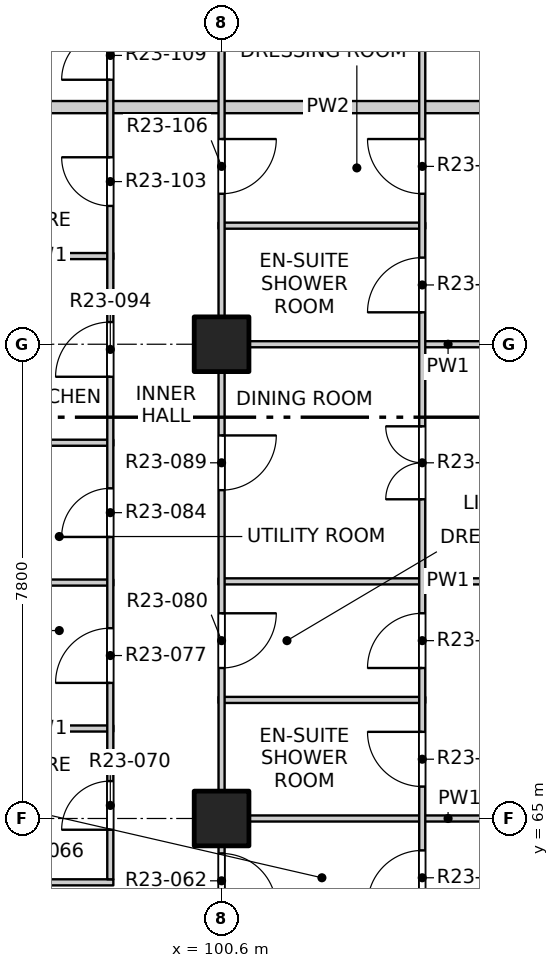
"""IFC4 building model, lengths in metres.
Left out: names, types, materials, properties, quantities, classifications, styles, units other than length and angle.
Written with IfcOpenShell. Run it as: python <this file> out.ifc"""

import sys

from ifc_helpers import new_model, si_unit, direction, frame, frame_2d, origin, origin_2d, place, context, subcontext, project, spatial, rectangle, extrude, element, fill, save


model = new_model("IFC4")
c1 = context("Model", 3, precision=1e-05, world=origin(), true_north=direction((0.0, 1.0)))
c2 = subcontext(c1, "Body", "Model", "MODEL_VIEW")
j1 = project(units=[si_unit("LENGTHUNIT", "METRE"), si_unit("PLANEANGLEUNIT", "RADIAN")], contexts=[c1])
p1 = place(None, origin())
s1 = spatial("IfcSite", under=j1, at=p1, CompositionType="ELEMENT")
p2 = place(p1, origin())
s2 = spatial("IfcBuilding", under=s1, at=p2, CompositionType="ELEMENT")
p3 = place(p2, frame((0.0, 0.0, 238.1)))
s3 = spatial("IfcBuildingStorey", under=s2, at=p3, CompositionType="ELEMENT", Elevation=238.1)
for number, where, z_axis, x_axis in (
    (1, (100.6, 65.0, -0.25), (0.0, 0.0, 1.0), (1.0, 0.0, 0.0)),
    (2, (100.6, 72.8, -0.25), (0.0, 0.0, 1.0), (1.0, 0.0, 0.0)),
):
    element("IfcColumn", number, at=place(p3, frame(where, z_axis=z_axis, x_axis=x_axis)), inside=s3, PredefinedType="COLUMN", context=c2, shape_type="SweptSolid", body=[
        extrude(rectangle(XDim=0.9, YDim=0.9, at=origin_2d()), origin(), (0.0, 0.0, 1.0), 3.35),
    ])
p4 = place(p3, frame((96.6, 63.95, 0.0), z_axis=(0.0, 0.0, 1.0), x_axis=(1.0, 0.0, 0.0)))
e3 = element("IfcWall", 3, at=p4, inside=s3, PredefinedType="PARTITIONING", context=c2, shape_type="SweptSolid", body=[
    extrude(rectangle(XDim=2.22, YDim=0.1, at=frame_2d((1.11, 0.0))), origin(), (0.0, 0.0, 1.0), 3.1),
])
p5 = place(p3, frame((100.55, 65.0, 0.0), z_axis=(0.0, 0.0, 1.0), x_axis=(1.0, 0.0, 0.0)))
e4 = element("IfcWall", 4, at=p5, inside=s3, PredefinedType="PARTITIONING", context=c2, shape_type="SweptSolid", body=[
    extrude(rectangle(XDim=7.55, YDim=0.1, at=frame_2d((3.775, 0.0))), origin(), (0.0, 0.0, 1.0), 3.1),
])
p6 = place(p3, frame((96.6, 66.48, 0.0), z_axis=(0.0, 0.0, 1.0), x_axis=(1.0, 0.0, 0.0)))
e5 = element("IfcWall", 5, at=p6, inside=s3, PredefinedType="PARTITIONING", context=c2, shape_type="SweptSolid", body=[
    extrude(rectangle(XDim=2.22, YDim=0.1, at=frame_2d((1.11, 0.0))), origin(), (0.0, 0.0, 1.0), 3.1),
])
p7 = place(p3, frame((100.55, 66.95, 0.0), z_axis=(0.0, 0.0, 1.0), x_axis=(1.0, 0.0, 0.0)))
e6 = element("IfcWall", 6, at=p7, inside=s3, PredefinedType="PARTITIONING", context=c2, shape_type="SweptSolid", body=[
    extrude(rectangle(XDim=3.4, YDim=0.1, at=frame_2d((1.7, 0.0))), origin(), (0.0, 0.0, 1.0), 3.1),
])
p8 = place(p3, frame((96.6, 68.88, 0.0), z_axis=(0.0, 0.0, 1.0), x_axis=(1.0, 0.0, 0.0)))
e7 = element("IfcWall", 7, at=p8, inside=s3, PredefinedType="PARTITIONING", context=c2, shape_type="SweptSolid", body=[
    extrude(rectangle(XDim=2.22, YDim=0.1, at=frame_2d((1.11, 0.0))), origin(), (0.0, 0.0, 1.0), 3.1),
])
p9 = place(p3, frame((100.55, 68.9, 0.0), z_axis=(0.0, 0.0, 1.0), x_axis=(1.0, 0.0, 0.0)))
e8 = element("IfcWall", 8, at=p9, inside=s3, PredefinedType="PARTITIONING", context=c2, shape_type="SweptSolid", body=[
    extrude(rectangle(XDim=7.55, YDim=0.1, at=frame_2d((3.775, 0.0))), origin(), (0.0, 0.0, 1.0), 3.1),
])
p10 = place(p3, frame((96.6, 71.18, 0.0), z_axis=(0.0, 0.0, 1.0), x_axis=(1.0, 0.0, 0.0)))
e9 = element("IfcWall", 9, at=p10, inside=s3, PredefinedType="PARTITIONING", context=c2, shape_type="SweptSolid", body=[
    extrude(rectangle(XDim=2.22, YDim=0.1, at=frame_2d((1.11, 0.0))), origin(), (0.0, 0.0, 1.0), 3.1),
])
p11 = place(p3, frame((100.55, 72.8, 0.0), z_axis=(0.0, 0.0, 1.0), x_axis=(1.0, 0.0, 0.0)))
e10 = element("IfcWall", 10, at=p11, inside=s3, PredefinedType="PARTITIONING", context=c2, shape_type="SweptSolid", body=[
    extrude(rectangle(XDim=7.55, YDim=0.1, at=frame_2d((3.775, 0.0))), origin(), (0.0, 0.0, 1.0), 3.1),
])
p12 = place(p3, frame((96.6, 74.25, 0.0), z_axis=(0.0, 0.0, 1.0), x_axis=(1.0, 0.0, 0.0)))
e11 = element("IfcWall", 11, at=p12, inside=s3, PredefinedType="PARTITIONING", context=c2, shape_type="SweptSolid", body=[
    extrude(rectangle(XDim=2.22, YDim=0.1, at=frame_2d((1.11, 0.0))), origin(), (0.0, 0.0, 1.0), 3.1),
])
p13 = place(p3, frame((100.55, 74.75, 0.0), z_axis=(0.0, 0.0, 1.0), x_axis=(1.0, 0.0, 0.0)))
e12 = element("IfcWall", 12, at=p13, inside=s3, PredefinedType="PARTITIONING", context=c2, shape_type="SweptSolid", body=[
    extrude(rectangle(XDim=3.4, YDim=0.1, at=frame_2d((1.7, 0.0))), origin(), (0.0, 0.0, 1.0), 3.1),
])
p14 = place(p3, frame((96.6, 76.7, 0.0), z_axis=(0.0, 0.0, 1.0), x_axis=(1.0, 0.0, 0.0)))
e13 = element("IfcWall", 13, at=p14, inside=s3, PredefinedType="PARTITIONING", context=c2, shape_type="SweptSolid", body=[
    extrude(rectangle(XDim=11.5, YDim=0.2, at=frame_2d((5.75, 0.0))), origin(), (0.0, 0.0, 1.0), 3.1),
])
p15 = place(p3, frame((98.77, 64.0, 0.0), z_axis=(0.0, 0.0, 1.0), x_axis=(0.0, 1.0, 0.0)))
e14 = element("IfcWall", 14, at=p15, inside=s3, PredefinedType="PARTITIONING", context=c2, shape_type="SweptSolid", body=[
    extrude(rectangle(XDim=14.35, YDim=0.1, at=frame_2d((7.175, 0.0))), origin(), (0.0, 0.0, 1.0), 3.1),
])
p16 = place(p15, frame((0.815, 0.0, 0.0)))
e15 = element("IfcOpeningElement", 15, at=p16, cuts=e14, PredefinedType="OPENING", context=c2, shape_type="SweptSolid", body=[
    extrude(rectangle(XDim=0.8, YDim=2.1, at=frame_2d((0.4, 1.05))), frame((0.0, 0.06, 0.0), z_axis=(0.0, -1.0, 0.0), x_axis=(1.0, 0.0, 0.0)), (0.0, 0.0, 1.0), 0.12),
])
p17 = place(p15, frame((3.23, 0.0, 0.0)))
e16 = element("IfcOpeningElement", 16, at=p17, cuts=e14, PredefinedType="OPENING", context=c2, shape_type="SweptSolid", body=[
    extrude(rectangle(XDim=0.9, YDim=2.1, at=frame_2d((0.45, 1.05))), frame((0.0, 0.06, 0.0), z_axis=(0.0, -1.0, 0.0), x_axis=(1.0, 0.0, 0.0)), (0.0, 0.0, 1.0), 0.12),
])
p18 = place(p15, frame((5.63, 0.0, 0.0)))
e17 = element("IfcOpeningElement", 17, at=p18, cuts=e14, PredefinedType="OPENING", context=c2, shape_type="SweptSolid", body=[
    extrude(rectangle(XDim=0.8, YDim=2.1, at=frame_2d((0.4, 1.05))), frame((0.0, 0.06, 0.0), z_axis=(0.0, -1.0, 0.0), x_axis=(1.0, 0.0, 0.0)), (0.0, 0.0, 1.0), 0.12),
])
p19 = place(p15, frame((8.265, 0.0, 0.0)))
e18 = element("IfcOpeningElement", 18, at=p19, cuts=e14, PredefinedType="OPENING", context=c2, shape_type="SweptSolid", body=[
    extrude(rectangle(XDim=0.9, YDim=2.1, at=frame_2d((0.45, 1.05))), frame((0.0, 0.06, 0.0), z_axis=(0.0, -1.0, 0.0), x_axis=(1.0, 0.0, 0.0)), (0.0, 0.0, 1.0), 0.12),
])
p20 = place(p15, frame((11.075, 0.0, 0.0)))
e19 = element("IfcOpeningElement", 19, at=p20, cuts=e14, PredefinedType="OPENING", context=c2, shape_type="SweptSolid", body=[
    extrude(rectangle(XDim=0.8, YDim=2.1, at=frame_2d((0.4, 1.05))), frame((0.0, 0.06, 0.0), z_axis=(0.0, -1.0, 0.0), x_axis=(1.0, 0.0, 0.0)), (0.0, 0.0, 1.0), 0.12),
])
p21 = place(p15, frame((13.15, 0.0, 0.0)))
e20 = element("IfcOpeningElement", 20, at=p21, cuts=e14, PredefinedType="OPENING", context=c2, shape_type="SweptSolid", body=[
    extrude(rectangle(XDim=0.8, YDim=2.1, at=frame_2d((0.4, 1.05))), frame((0.0, 0.06, 0.0), z_axis=(0.0, -1.0, 0.0), x_axis=(1.0, 0.0, 0.0)), (0.0, 0.0, 1.0), 0.12),
])
p22 = place(p3, frame((100.6, 41.9, 0.0), z_axis=(0.0, 0.0, 1.0), x_axis=(0.0, 1.0, 0.0)))
e21 = element("IfcWall", 21, at=p22, inside=s3, PredefinedType="PARTITIONING", context=c2, shape_type="SweptSolid", body=[
    extrude(rectangle(XDim=46.2, YDim=0.1, at=frame_2d((23.1, 0.0))), origin(), (0.0, 0.0, 1.0), 3.1),
])
p23 = place(p22, frame((1.2, 0.0, 0.0)))
e22 = element("IfcOpeningElement", 22, at=p23, cuts=e21, PredefinedType="OPENING", context=c2, shape_type="SweptSolid", body=[
    extrude(rectangle(XDim=0.9, YDim=2.1, at=frame_2d((0.45, 1.05))), frame((0.0, 0.06, 0.0), z_axis=(0.0, -1.0, 0.0), x_axis=(1.0, 0.0, 0.0)), (0.0, 0.0, 1.0), 0.12),
])
p24 = place(p22, frame((6.025, 0.0, 0.0)))
e23 = element("IfcOpeningElement", 23, at=p24, cuts=e21, PredefinedType="OPENING", context=c2, shape_type="SweptSolid", body=[
    extrude(rectangle(XDim=0.9, YDim=2.1, at=frame_2d((0.45, 1.05))), frame((0.0, 0.06, 0.0), z_axis=(0.0, -1.0, 0.0), x_axis=(1.0, 0.0, 0.0)), (0.0, 0.0, 1.0), 0.12),
])
p25 = place(p22, frame((9.975, 0.0, 0.0)))
e24 = element("IfcOpeningElement", 24, at=p25, cuts=e21, PredefinedType="OPENING", context=c2, shape_type="SweptSolid", body=[
    extrude(rectangle(XDim=0.9, YDim=2.1, at=frame_2d((0.45, 1.05))), frame((0.0, 0.06, 0.0), z_axis=(0.0, -1.0, 0.0), x_axis=(1.0, 0.0, 0.0)), (0.0, 0.0, 1.0), 0.12),
])
p26 = place(p22, frame((12.9, 0.0, 0.0)))
e25 = element("IfcOpeningElement", 25, at=p26, cuts=e21, PredefinedType="OPENING", context=c2, shape_type="SweptSolid", body=[
    extrude(rectangle(XDim=0.9, YDim=2.1, at=frame_2d((0.45, 1.05))), frame((0.0, 0.06, 0.0), z_axis=(0.0, -1.0, 0.0), x_axis=(1.0, 0.0, 0.0)), (0.0, 0.0, 1.0), 0.12),
])
p27 = place(p22, frame((17.775, 0.0, 0.0)))
e26 = element("IfcOpeningElement", 26, at=p27, cuts=e21, PredefinedType="OPENING", context=c2, shape_type="SweptSolid", body=[
    extrude(rectangle(XDim=0.9, YDim=2.1, at=frame_2d((0.45, 1.05))), frame((0.0, 0.06, 0.0), z_axis=(0.0, -1.0, 0.0), x_axis=(1.0, 0.0, 0.0)), (0.0, 0.0, 1.0), 0.12),
])
p28 = place(p22, frame((21.625, 0.0, 0.0)))
e27 = element("IfcOpeningElement", 27, at=p28, cuts=e21, PredefinedType="OPENING", context=c2, shape_type="SweptSolid", body=[
    extrude(rectangle(XDim=0.9, YDim=2.1, at=frame_2d((0.45, 1.05))), frame((0.0, 0.06, 0.0), z_axis=(0.0, -1.0, 0.0), x_axis=(1.0, 0.0, 0.0)), (0.0, 0.0, 1.0), 0.12),
])
p29 = place(p22, frame((25.575, 0.0, 0.0)))
e28 = element("IfcOpeningElement", 28, at=p29, cuts=e21, PredefinedType="OPENING", context=c2, shape_type="SweptSolid", body=[
    extrude(rectangle(XDim=0.9, YDim=2.1, at=frame_2d((0.45, 1.05))), frame((0.0, 0.06, 0.0), z_axis=(0.0, -1.0, 0.0), x_axis=(1.0, 0.0, 0.0)), (0.0, 0.0, 1.0), 0.12),
])
p30 = place(p22, frame((28.5, 0.0, 0.0)))
e29 = element("IfcOpeningElement", 29, at=p30, cuts=e21, PredefinedType="OPENING", context=c2, shape_type="SweptSolid", body=[
    extrude(rectangle(XDim=0.9, YDim=2.1, at=frame_2d((0.45, 1.05))), frame((0.0, 0.06, 0.0), z_axis=(0.0, -1.0, 0.0), x_axis=(1.0, 0.0, 0.0)), (0.0, 0.0, 1.0), 0.12),
])
p31 = place(p22, frame((33.375, 0.0, 0.0)))
e30 = element("IfcOpeningElement", 30, at=p31, cuts=e21, PredefinedType="OPENING", context=c2, shape_type="SweptSolid", body=[
    extrude(rectangle(XDim=0.9, YDim=2.1, at=frame_2d((0.45, 1.05))), frame((0.0, 0.06, 0.0), z_axis=(0.0, -1.0, 0.0), x_axis=(1.0, 0.0, 0.0)), (0.0, 0.0, 1.0), 0.12),
])
p32 = place(p22, frame((36.3, 0.0, 0.0)))
e31 = element("IfcOpeningElement", 31, at=p32, cuts=e21, PredefinedType="OPENING", context=c2, shape_type="SweptSolid", body=[
    extrude(rectangle(XDim=0.9, YDim=2.1, at=frame_2d((0.45, 1.05))), frame((0.0, 0.06, 0.0), z_axis=(0.0, -1.0, 0.0), x_axis=(1.0, 0.0, 0.0)), (0.0, 0.0, 1.0), 0.12),
])
p33 = place(p22, frame((40.2, 0.0, 0.0)))
e32 = element("IfcOpeningElement", 32, at=p33, cuts=e21, PredefinedType="OPENING", context=c2, shape_type="SweptSolid", body=[
    extrude(rectangle(XDim=0.9, YDim=2.1, at=frame_2d((0.45, 1.05))), frame((0.0, 0.06, 0.0), z_axis=(0.0, -1.0, 0.0), x_axis=(1.0, 0.0, 0.0)), (0.0, 0.0, 1.0), 0.12),
])
p34 = place(p22, frame((44.1, 0.0, 0.0)))
e33 = element("IfcOpeningElement", 33, at=p34, cuts=e21, PredefinedType="OPENING", context=c2, shape_type="SweptSolid", body=[
    extrude(rectangle(XDim=0.9, YDim=2.1, at=frame_2d((0.45, 1.05))), frame((0.0, 0.06, 0.0), z_axis=(0.0, -1.0, 0.0), x_axis=(1.0, 0.0, 0.0)), (0.0, 0.0, 1.0), 0.12),
])
p35 = place(p3, frame((103.9, 61.2, 0.0), z_axis=(0.0, 0.0, 1.0), x_axis=(0.0, 1.0, 0.0)))
e34 = element("IfcWall", 34, at=p35, inside=s3, PredefinedType="PARTITIONING", context=c2, shape_type="SweptSolid", body=[
    extrude(rectangle(XDim=26.9, YDim=0.1, at=frame_2d((13.45, 0.0))), origin(), (0.0, 0.0, 1.0), 3.1),
])
p36 = place(p35, frame((0.425, 0.0, 0.0)))
e35 = element("IfcOpeningElement", 35, at=p36, cuts=e34, PredefinedType="OPENING", context=c2, shape_type="SweptSolid", body=[
    extrude(rectangle(XDim=0.9, YDim=2.1, at=frame_2d((0.45, 1.05))), frame((0.0, 0.06, 0.0), z_axis=(0.0, -1.0, 0.0), x_axis=(1.0, 0.0, 0.0)), (0.0, 0.0, 1.0), 0.12),
])
p37 = place(p35, frame((2.375, 0.0, 0.0)))
e36 = element("IfcOpeningElement", 36, at=p37, cuts=e34, PredefinedType="OPENING", context=c2, shape_type="SweptSolid", body=[
    extrude(rectangle(XDim=0.9, YDim=2.1, at=frame_2d((0.45, 1.05))), frame((0.0, 0.06, 0.0), z_axis=(0.0, -1.0, 0.0), x_axis=(1.0, 0.0, 0.0)), (0.0, 0.0, 1.0), 0.12),
])
p38 = place(p35, frame((4.325, 0.0, 0.0)))
e37 = element("IfcOpeningElement", 37, at=p38, cuts=e34, PredefinedType="OPENING", context=c2, shape_type="SweptSolid", body=[
    extrude(rectangle(XDim=0.9, YDim=2.1, at=frame_2d((0.45, 1.05))), frame((0.0, 0.06, 0.0), z_axis=(0.0, -1.0, 0.0), x_axis=(1.0, 0.0, 0.0)), (0.0, 0.0, 1.0), 0.12),
])
p39 = place(p35, frame((6.275, 0.0, 0.0)))
e38 = element("IfcOpeningElement", 38, at=p39, cuts=e34, PredefinedType="OPENING", context=c2, shape_type="SweptSolid", body=[
    extrude(rectangle(XDim=0.9, YDim=2.1, at=frame_2d((0.45, 1.05))), frame((0.0, 0.06, 0.0), z_axis=(0.0, -1.0, 0.0), x_axis=(1.0, 0.0, 0.0)), (0.0, 0.0, 1.0), 0.12),
])
p40 = place(p35, frame((9.05, 0.0, 0.0)))
e39 = element("IfcOpeningElement", 39, at=p40, cuts=e34, PredefinedType="OPENING", context=c2, shape_type="SweptSolid", body=[
    extrude(rectangle(XDim=1.2, YDim=2.1, at=frame_2d((0.6, 1.05))), frame((0.0, 0.06, 0.0), z_axis=(0.0, -1.0, 0.0), x_axis=(1.0, 0.0, 0.0)), (0.0, 0.0, 1.0), 0.12),
])
p41 = place(p35, frame((12.125, 0.0, 0.0)))
e40 = element("IfcOpeningElement", 40, at=p41, cuts=e34, PredefinedType="OPENING", context=c2, shape_type="SweptSolid", body=[
    extrude(rectangle(XDim=0.9, YDim=2.1, at=frame_2d((0.45, 1.05))), frame((0.0, 0.06, 0.0), z_axis=(0.0, -1.0, 0.0), x_axis=(1.0, 0.0, 0.0)), (0.0, 0.0, 1.0), 0.12),
])
p42 = place(p35, frame((14.075, 0.0, 0.0)))
e41 = element("IfcOpeningElement", 41, at=p42, cuts=e34, PredefinedType="OPENING", context=c2, shape_type="SweptSolid", body=[
    extrude(rectangle(XDim=0.9, YDim=2.1, at=frame_2d((0.45, 1.05))), frame((0.0, 0.06, 0.0), z_axis=(0.0, -1.0, 0.0), x_axis=(1.0, 0.0, 0.0)), (0.0, 0.0, 1.0), 0.12),
])
p43 = place(p35, frame((16.85, 0.0, 0.0)))
e42 = element("IfcOpeningElement", 42, at=p43, cuts=e34, PredefinedType="OPENING", context=c2, shape_type="SweptSolid", body=[
    extrude(rectangle(XDim=1.2, YDim=2.1, at=frame_2d((0.6, 1.05))), frame((0.0, 0.06, 0.0), z_axis=(0.0, -1.0, 0.0), x_axis=(1.0, 0.0, 0.0)), (0.0, 0.0, 1.0), 0.12),
])
p44 = place(p35, frame((20.75, 0.0, 0.0)))
e43 = element("IfcOpeningElement", 43, at=p44, cuts=e34, PredefinedType="OPENING", context=c2, shape_type="SweptSolid", body=[
    extrude(rectangle(XDim=1.2, YDim=2.1, at=frame_2d((0.6, 1.05))), frame((0.0, 0.06, 0.0), z_axis=(0.0, -1.0, 0.0), x_axis=(1.0, 0.0, 0.0)), (0.0, 0.0, 1.0), 0.12),
])
p45 = place(p35, frame((24.65, 0.0, 0.0)))
e44 = element("IfcOpeningElement", 44, at=p45, cuts=e34, PredefinedType="OPENING", context=c2, shape_type="SweptSolid", body=[
    extrude(rectangle(XDim=1.2, YDim=2.1, at=frame_2d((0.6, 1.05))), frame((0.0, 0.06, 0.0), z_axis=(0.0, -1.0, 0.0), x_axis=(1.0, 0.0, 0.0)), (0.0, 0.0, 1.0), 0.12),
])
p46 = place(p28, origin())
e45 = element("IfcDoor", 45, at=p46, inside=s3, OperationType="SINGLE_SWING_RIGHT", PredefinedType="DOOR", context=c2, shape_type="SweptSolid", body=[
    extrude(rectangle(XDim=0.9, YDim=2.1, at=frame_2d((0.45, 1.05))), frame((0.0, 0.025, 0.0), z_axis=(0.0, -1.0, 0.0), x_axis=(1.0, 0.0, 0.0)), (0.0, 0.0, 1.0), 0.05),
])
fill(e27, e45)
p47 = place(p37, origin())
e46 = element("IfcDoor", 46, at=p47, inside=s3, OperationType="SINGLE_SWING_LEFT", PredefinedType="DOOR", context=c2, shape_type="SweptSolid", body=[
    extrude(rectangle(XDim=0.9, YDim=2.1, at=frame_2d((0.45, 1.05))), frame((0.0, 0.025, 0.0), z_axis=(0.0, -1.0, 0.0), x_axis=(1.0, 0.0, 0.0)), (0.0, 0.0, 1.0), 0.05),
])
fill(e36, e46)
p48 = place(p16, origin())
e47 = element("IfcDoor", 47, at=p48, inside=s3, OperationType="SINGLE_SWING_LEFT", PredefinedType="DOOR", context=c2, shape_type="SweptSolid", body=[
    extrude(rectangle(XDim=0.8, YDim=2.1, at=frame_2d((0.4, 1.05))), frame((0.0, 0.025, 0.0), z_axis=(0.0, -1.0, 0.0), x_axis=(1.0, 0.0, 0.0)), (0.0, 0.0, 1.0), 0.05),
])
fill(e15, e47)
p49 = place(p38, origin())
e48 = element("IfcDoor", 48, at=p49, inside=s3, OperationType="SINGLE_SWING_RIGHT", PredefinedType="DOOR", context=c2, shape_type="SweptSolid", body=[
    extrude(rectangle(XDim=0.9, YDim=2.1, at=frame_2d((0.45, 1.05))), frame((0.0, 0.025, 0.0), z_axis=(0.0, -1.0, 0.0), x_axis=(1.0, 0.0, 0.0)), (0.0, 0.0, 1.0), 0.05),
])
fill(e37, e48)
p50 = place(p17, origin())
e49 = element("IfcDoor", 49, at=p50, inside=s3, OperationType="SINGLE_SWING_LEFT", PredefinedType="DOOR", context=c2, shape_type="SweptSolid", body=[
    extrude(rectangle(XDim=0.9, YDim=2.1, at=frame_2d((0.45, 1.05))), frame((0.0, 0.025, 0.0), z_axis=(0.0, -1.0, 0.0), x_axis=(1.0, 0.0, 0.0)), (0.0, 0.0, 1.0), 0.05),
])
fill(e16, e49)
p51 = place(p29, origin())
e50 = element("IfcDoor", 50, at=p51, inside=s3, OperationType="SINGLE_SWING_LEFT", PredefinedType="DOOR", context=c2, shape_type="SweptSolid", body=[
    extrude(rectangle(XDim=0.9, YDim=2.1, at=frame_2d((0.45, 1.05))), frame((0.0, 0.025, 0.0), z_axis=(0.0, -1.0, 0.0), x_axis=(1.0, 0.0, 0.0)), (0.0, 0.0, 1.0), 0.05),
])
fill(e28, e50)
p52 = place(p39, origin())
e51 = element("IfcDoor", 51, at=p52, inside=s3, OperationType="SINGLE_SWING_LEFT", PredefinedType="DOOR", context=c2, shape_type="SweptSolid", body=[
    extrude(rectangle(XDim=0.9, YDim=2.1, at=frame_2d((0.45, 1.05))), frame((0.0, 0.025, 0.0), z_axis=(0.0, -1.0, 0.0), x_axis=(1.0, 0.0, 0.0)), (0.0, 0.0, 1.0), 0.05),
])
fill(e38, e51)
p53 = place(p18, origin())
e52 = element("IfcDoor", 52, at=p53, inside=s3, OperationType="SINGLE_SWING_LEFT", PredefinedType="DOOR", context=c2, shape_type="SweptSolid", body=[
    extrude(rectangle(XDim=0.8, YDim=2.1, at=frame_2d((0.4, 1.05))), frame((0.0, 0.025, 0.0), z_axis=(0.0, -1.0, 0.0), x_axis=(1.0, 0.0, 0.0)), (0.0, 0.0, 1.0), 0.05),
])
fill(e17, e52)
p54 = place(p30, origin())
e53 = element("IfcDoor", 53, at=p54, inside=s3, OperationType="SINGLE_SWING_LEFT", PredefinedType="DOOR", context=c2, shape_type="SweptSolid", body=[
    extrude(rectangle(XDim=0.9, YDim=2.1, at=frame_2d((0.45, 1.05))), frame((0.0, 0.025, 0.0), z_axis=(0.0, -1.0, 0.0), x_axis=(1.0, 0.0, 0.0)), (0.0, 0.0, 1.0), 0.05),
])
fill(e29, e53)
p55 = place(p40, origin())
e54 = element("IfcDoor", 54, at=p55, inside=s3, OperationType="DOUBLE_DOOR_SINGLE_SWING", PredefinedType="DOOR", context=c2, shape_type="SweptSolid", body=[
    extrude(rectangle(XDim=1.2, YDim=2.1, at=frame_2d((0.6, 1.05))), frame((0.0, 0.025, 0.0), z_axis=(0.0, -1.0, 0.0), x_axis=(1.0, 0.0, 0.0)), (0.0, 0.0, 1.0), 0.05),
])
fill(e39, e54)
p56 = place(p19, origin())
e55 = element("IfcDoor", 55, at=p56, inside=s3, OperationType="SINGLE_SWING_LEFT", PredefinedType="DOOR", context=c2, shape_type="SweptSolid", body=[
    extrude(rectangle(XDim=0.9, YDim=2.1, at=frame_2d((0.45, 1.05))), frame((0.0, 0.025, 0.0), z_axis=(0.0, -1.0, 0.0), x_axis=(1.0, 0.0, 0.0)), (0.0, 0.0, 1.0), 0.05),
])
fill(e18, e55)
p57 = place(p41, origin())
e56 = element("IfcDoor", 56, at=p57, inside=s3, OperationType="SINGLE_SWING_LEFT", PredefinedType="DOOR", context=c2, shape_type="SweptSolid", body=[
    extrude(rectangle(XDim=0.9, YDim=2.1, at=frame_2d((0.45, 1.05))), frame((0.0, 0.025, 0.0), z_axis=(0.0, -1.0, 0.0), x_axis=(1.0, 0.0, 0.0)), (0.0, 0.0, 1.0), 0.05),
])
fill(e40, e56)
p58 = place(p20, origin())
e57 = element("IfcDoor", 57, at=p58, inside=s3, OperationType="SINGLE_SWING_RIGHT", PredefinedType="DOOR", context=c2, shape_type="SweptSolid", body=[
    extrude(rectangle(XDim=0.8, YDim=2.1, at=frame_2d((0.4, 1.05))), frame((0.0, 0.025, 0.0), z_axis=(0.0, -1.0, 0.0), x_axis=(1.0, 0.0, 0.0)), (0.0, 0.0, 1.0), 0.05),
])
fill(e19, e57)
p59 = place(p31, origin())
e58 = element("IfcDoor", 58, at=p59, inside=s3, OperationType="SINGLE_SWING_LEFT", PredefinedType="DOOR", context=c2, shape_type="SweptSolid", body=[
    extrude(rectangle(XDim=0.9, YDim=2.1, at=frame_2d((0.45, 1.05))), frame((0.0, 0.025, 0.0), z_axis=(0.0, -1.0, 0.0), x_axis=(1.0, 0.0, 0.0)), (0.0, 0.0, 1.0), 0.05),
])
fill(e30, e58)
p60 = place(p42, origin())
e59 = element("IfcDoor", 59, at=p60, inside=s3, OperationType="SINGLE_SWING_RIGHT", PredefinedType="DOOR", context=c2, shape_type="SweptSolid", body=[
    extrude(rectangle(XDim=0.9, YDim=2.1, at=frame_2d((0.45, 1.05))), frame((0.0, 0.025, 0.0), z_axis=(0.0, -1.0, 0.0), x_axis=(1.0, 0.0, 0.0)), (0.0, 0.0, 1.0), 0.05),
])
fill(e41, e59)
p61 = place(p21, origin())
e60 = element("IfcDoor", 60, at=p61, inside=s3, OperationType="SINGLE_SWING_LEFT", PredefinedType="DOOR", context=c2, shape_type="SweptSolid", body=[
    extrude(rectangle(XDim=0.8, YDim=2.1, at=frame_2d((0.4, 1.05))), frame((0.0, 0.025, 0.0), z_axis=(0.0, -1.0, 0.0), x_axis=(1.0, 0.0, 0.0)), (0.0, 0.0, 1.0), 0.05),
])
fill(e20, e60)
save(model, sys.argv[1])
